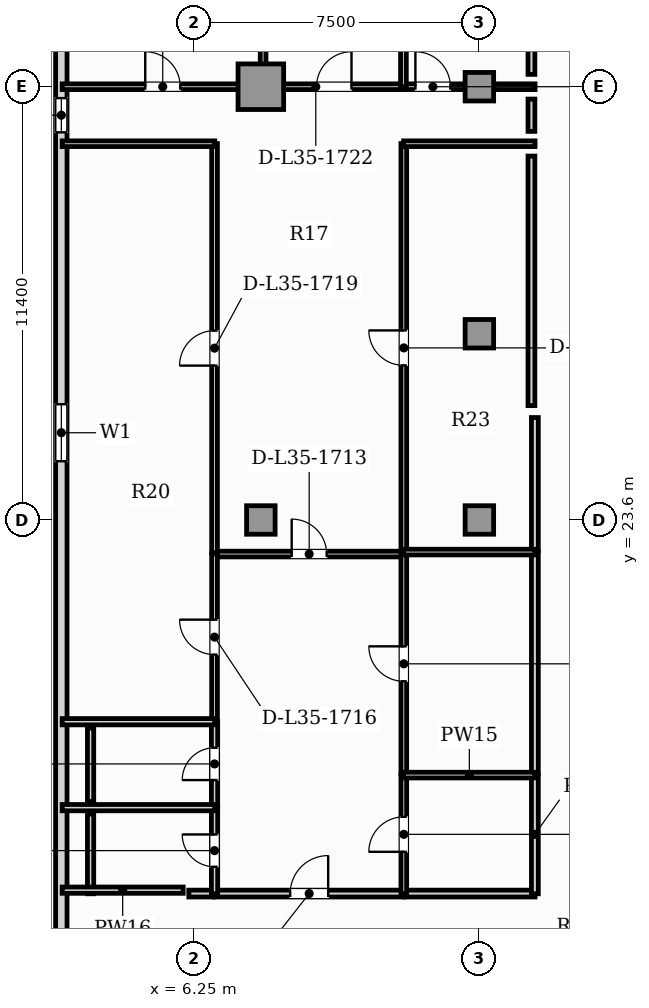
"""IFC4 building model, lengths in metres.
Left out: names, types, materials, properties, quantities, classifications, styles, units other than length and angle.
Written with IfcOpenShell. Run it as: python <this file> out.ifc"""

import sys

from ifc_helpers import new_model, si_unit, direction, frame, frame_2d, origin, origin_2d, place, context, subcontext, project, spatial, rectangle, hollow_rectangle, extrude, element, fill, save


model = new_model("IFC4")
c1 = context("Model", 3, precision=1e-05, world=origin(), true_north=direction((0.0, 1.0)))
c2 = subcontext(c1, "Body", "Model", "MODEL_VIEW")
j1 = project(units=[si_unit("LENGTHUNIT", "METRE"), si_unit("PLANEANGLEUNIT", "RADIAN")], contexts=[c1])
p1 = place(None, origin())
s1 = spatial("IfcSite", under=j1, at=p1, CompositionType="ELEMENT")
p2 = place(p1, origin())
s2 = spatial("IfcBuilding", under=s1, at=p2, CompositionType="ELEMENT")
p3 = place(p2, frame((0.0, 0.0, 145.2)))
s3 = spatial("IfcBuildingStorey", under=s2, at=p3, CompositionType="ELEMENT", Elevation=145.2)
p4 = place(p3, frame((8.0, 35.0, 0.0), z_axis=(0.0, 0.0, 1.0), x_axis=(1.0, 0.0, 0.0)))
e1 = element("IfcColumn", 1, at=p4, inside=s3, PredefinedType="USERDEFINED", context=c2, shape_type="SweptSolid", body=[
    extrude(hollow_rectangle(XDim=1.2, YDim=1.2, WallThickness=0.07, at=origin_2d()), origin(), (0.0, 0.0, 1.0), 3.85),
])
for number, where, z_axis, x_axis in (
    (2, (8.0, 23.6, 0.0), (0.0, 0.0, 1.0), (1.0, 0.0, 0.0)),
    (3, (13.75, 23.6, 0.0), (0.0, 0.0, 1.0), (1.0, 0.0, 0.0)),
    (4, (13.75, 28.5, 0.0), (0.0, 0.0, 1.0), (1.0, 0.0, 0.0)),
    (5, (13.75, 35.0, 0.0), (0.0, 0.0, 1.0), (1.0, 0.0, 0.0)),
):
    element("IfcColumn", number, at=place(p3, frame(where, z_axis=z_axis, x_axis=x_axis)), inside=s3, PredefinedType="COLUMN", context=c2, shape_type="SweptSolid", body=[
        extrude(rectangle(XDim=0.75, YDim=0.75, at=origin_2d()), origin(), (0.0, 0.0, 1.0), 3.85),
    ])
p5 = place(p3, frame((2.75, 39.96, 0.0), z_axis=(0.0, 0.0, 1.0), x_axis=(0.0, -1.0, 0.0)))
e6 = element("IfcWall", 6, at=p5, inside=s3, PredefinedType="SOLIDWALL", context=c2, shape_type="SweptSolid", body=[
    extrude(rectangle(XDim=36.72, YDim=0.3, at=frame_2d((18.36, 0.0))), origin(), (0.0, 0.0, 1.0), 3.63),
])
p6 = place(p5, frame((5.26, 0.0, 0.95)))
e7 = element("IfcOpeningElement", 7, at=p6, cuts=e6, PredefinedType="OPENING", context=c2, shape_type="SweptSolid", body=[
    extrude(rectangle(XDim=0.9, YDim=1.5, at=frame_2d((0.45, 0.75))), frame((0.0, 0.16, 0.0), z_axis=(0.0, -1.0, 0.0), x_axis=(1.0, 0.0, 0.0)), (0.0, 0.0, 1.0), 0.32),
])
p7 = place(p5, frame((13.314, 0.0, 0.9)))
e8 = element("IfcOpeningElement", 8, at=p7, cuts=e6, PredefinedType="OPENING", context=c2, shape_type="SweptSolid", body=[
    extrude(rectangle(XDim=1.5, YDim=1.95, at=frame_2d((0.75, 0.975))), frame((0.0, 0.16, 0.0), z_axis=(0.0, -1.0, 0.0), x_axis=(1.0, 0.0, 0.0)), (0.0, 0.0, 1.0), 0.32),
])
p8 = place(p3, frame((6.777, 13.77, 0.0), z_axis=(0.0, 0.0, 1.0), x_axis=(1.0, 0.0, 0.0)))
e9 = element("IfcWall", 9, at=p8, inside=s3, PredefinedType="PARTITIONING", context=c2, shape_type="SweptSolid", body=[
    extrude(rectangle(XDim=4.99, YDim=0.18, at=frame_2d((2.495, 0.0))), origin(), (0.0, 0.0, 1.0), 3.63),
])
p9 = place(p8, frame((1.995, 0.0, 0.0)))
e10 = element("IfcOpeningElement", 10, at=p9, cuts=e9, PredefinedType="OPENING", context=c2, shape_type="SweptSolid", body=[
    extrude(rectangle(XDim=1.0, YDim=2.15, at=frame_2d((0.5, 1.075))), frame((0.0, 0.1, 0.0), z_axis=(0.0, -1.0, 0.0), x_axis=(1.0, 0.0, 0.0)), (0.0, 0.0, 1.0), 0.2),
])
p10 = place(p3, frame((6.105, 13.77, 0.0), z_axis=(0.0, 0.0, 1.0), x_axis=(1.0, 0.0, 0.0)))
e11 = element("IfcWall", 11, at=p10, inside=s3, PredefinedType="PARTITIONING", context=c2, shape_type="SweptSolid", body=[
    extrude(rectangle(XDim=0.642, YDim=0.18, at=frame_2d((0.321, 0.0))), origin(), (0.0, 0.0, 1.0), 3.63),
])
p11 = place(p3, frame((11.797, 13.77, 0.0), z_axis=(0.0, 0.0, 1.0), x_axis=(1.0, 0.0, 0.0)))
e12 = element("IfcWall", 12, at=p11, inside=s3, PredefinedType="PARTITIONING", context=c2, shape_type="SweptSolid", body=[
    extrude(rectangle(XDim=3.418, YDim=0.18, at=frame_2d((1.709, 0.0))), origin(), (0.0, 0.0, 1.0), 3.63),
])
p12 = place(p3, frame((15.21, 13.765, 0.0), z_axis=(0.0, 0.0, 1.0), x_axis=(0.0, 1.0, 0.0)))
e13 = element("IfcWall", 13, at=p12, inside=s3, PredefinedType="PARTITIONING", context=c2, shape_type="SweptSolid", body=[
    extrude(rectangle(XDim=3.127, YDim=0.18, at=frame_2d((1.564, 0.0))), origin(), (0.0, 0.0, 1.0), 3.63),
])
p13 = place(p3, frame((15.21, 16.922, 0.0), z_axis=(0.0, 0.0, 1.0), x_axis=(0.0, 1.0, 0.0)))
e14 = element("IfcWall", 14, at=p13, inside=s3, PredefinedType="PARTITIONING", context=c2, shape_type="SweptSolid", body=[
    extrude(rectangle(XDim=5.838, YDim=0.18, at=frame_2d((2.919, 0.0))), origin(), (0.0, 0.0, 1.0), 3.63),
])
p14 = place(p3, frame((15.21, 22.791, 0.0), z_axis=(0.0, 0.0, 1.0), x_axis=(0.0, 1.0, 0.0)))
e15 = element("IfcWall", 15, at=p14, inside=s3, PredefinedType="PARTITIONING", context=c2, shape_type="SweptSolid", body=[
    extrude(rectangle(XDim=3.504, YDim=0.18, at=frame_2d((1.752, 0.0))), origin(), (0.0, 0.0, 1.0), 3.63),
])
p15 = place(p3, frame((6.777, 22.703, 0.0), z_axis=(0.0, 0.0, 1.0), x_axis=(1.0, 0.0, 0.0)))
e16 = element("IfcWall", 16, at=p15, inside=s3, PredefinedType="PARTITIONING", context=c2, shape_type="SweptSolid", body=[
    extrude(rectangle(XDim=4.99, YDim=0.15, at=frame_2d((2.495, 0.0))), origin(), (0.0, 0.0, 1.0), 3.63),
])
p16 = place(p15, frame((2.035, 0.0, 0.0)))
e17 = element("IfcOpeningElement", 17, at=p16, cuts=e16, PredefinedType="OPENING", context=c2, shape_type="SweptSolid", body=[
    extrude(rectangle(XDim=0.92, YDim=2.1, at=frame_2d((0.46, 1.05))), frame((0.0, 0.085, 0.0), z_axis=(0.0, -1.0, 0.0), x_axis=(1.0, 0.0, 0.0)), (0.0, 0.0, 1.0), 0.17),
])
p17 = place(p3, frame((6.782, 13.765, 0.0), z_axis=(0.0, 0.0, 1.0), x_axis=(0.0, 1.0, 0.0)))
e18 = element("IfcWall", 18, at=p17, inside=s3, PredefinedType="PLUMBINGWALL", context=c2, shape_type="SweptSolid", body=[
    extrude(rectangle(XDim=2.271, YDim=0.165, at=frame_2d((1.135, 0.0))), origin(), (0.0, 0.0, 1.0), 3.63),
])
p18 = place(p17, frame((0.71, 0.0, 0.0)))
e19 = element("IfcOpeningElement", 19, at=p18, cuts=e18, PredefinedType="OPENING", context=c2, shape_type="SweptSolid", body=[
    extrude(rectangle(XDim=0.85, YDim=2.1, at=frame_2d((0.425, 1.05))), frame((0.0, 0.093, 0.0), z_axis=(0.0, -1.0, 0.0), x_axis=(1.0, 0.0, 0.0)), (0.0, 0.0, 1.0), 0.185),
])
p19 = place(p3, frame((6.782, 16.066, 0.0), z_axis=(0.0, 0.0, 1.0), x_axis=(0.0, 1.0, 0.0)))
e20 = element("IfcWall", 20, at=p19, inside=s3, PredefinedType="PLUMBINGWALL", context=c2, shape_type="SweptSolid", body=[
    extrude(rectangle(XDim=2.231, YDim=0.165, at=frame_2d((1.115, 0.0))), origin(), (0.0, 0.0, 1.0), 3.63),
])
p20 = place(p19, frame((0.69, 0.0, 0.0)))
e21 = element("IfcOpeningElement", 21, at=p20, cuts=e20, PredefinedType="OPENING", context=c2, shape_type="SweptSolid", body=[
    extrude(rectangle(XDim=0.85, YDim=2.1, at=frame_2d((0.425, 1.05))), frame((0.0, 0.093, 0.0), z_axis=(0.0, -1.0, 0.0), x_axis=(1.0, 0.0, 0.0)), (0.0, 0.0, 1.0), 0.185),
])
p21 = place(p3, frame((6.782, 18.327, 0.0), z_axis=(0.0, 0.0, 1.0), x_axis=(0.0, 1.0, 0.0)))
e22 = element("IfcWall", 22, at=p21, inside=s3, PredefinedType="PARTITIONING", context=c2, shape_type="SweptSolid", body=[
    extrude(rectangle(XDim=4.381, YDim=0.15, at=frame_2d((2.191, 0.0))), origin(), (0.0, 0.0, 1.0), 3.63),
])
p22 = place(p21, frame((1.731, 0.0, 0.0)))
e23 = element("IfcOpeningElement", 23, at=p22, cuts=e22, PredefinedType="OPENING", context=c2, shape_type="SweptSolid", body=[
    extrude(rectangle(XDim=0.92, YDim=2.1, at=frame_2d((0.46, 1.05))), frame((0.0, 0.085, 0.0), z_axis=(0.0, -1.0, 0.0), x_axis=(1.0, 0.0, 0.0)), (0.0, 0.0, 1.0), 0.17),
])
p23 = place(p3, frame((11.762, 13.765, 0.0), z_axis=(0.0, 0.0, 1.0), x_axis=(0.0, 1.0, 0.0)))
e24 = element("IfcWall", 24, at=p23, inside=s3, PredefinedType="PARTITIONING", context=c2, shape_type="SweptSolid", body=[
    extrude(rectangle(XDim=3.127, YDim=0.15, at=frame_2d((1.564, 0.0))), origin(), (0.0, 0.0, 1.0), 3.63),
])
p24 = place(p23, frame((1.104, 0.0, 0.0)))
e25 = element("IfcOpeningElement", 25, at=p24, cuts=e24, PredefinedType="OPENING", context=c2, shape_type="SweptSolid", body=[
    extrude(rectangle(XDim=0.92, YDim=2.1, at=frame_2d((0.46, 1.05))), frame((0.0, 0.085, 0.0), z_axis=(0.0, -1.0, 0.0), x_axis=(1.0, 0.0, 0.0)), (0.0, 0.0, 1.0), 0.17),
])
p25 = place(p3, frame((11.762, 16.922, 0.0), z_axis=(0.0, 0.0, 1.0), x_axis=(0.0, 1.0, 0.0)))
e26 = element("IfcWall", 26, at=p25, inside=s3, PredefinedType="PARTITIONING", context=c2, shape_type="SweptSolid", body=[
    extrude(rectangle(XDim=5.786, YDim=0.15, at=frame_2d((2.893, 0.0))), origin(), (0.0, 0.0, 1.0), 3.63),
])
p26 = place(p25, frame((2.433, 0.0, 0.0)))
e27 = element("IfcOpeningElement", 27, at=p26, cuts=e26, PredefinedType="OPENING", context=c2, shape_type="SweptSolid", body=[
    extrude(rectangle(XDim=0.92, YDim=2.1, at=frame_2d((0.46, 1.05))), frame((0.0, 0.085, 0.0), z_axis=(0.0, -1.0, 0.0), x_axis=(1.0, 0.0, 0.0)), (0.0, 0.0, 1.0), 0.17),
])
p27 = place(p3, frame((6.782, 22.738, 0.0), z_axis=(0.0, 0.0, 1.0), x_axis=(0.0, 1.0, 0.0)))
e28 = element("IfcWall", 28, at=p27, inside=s3, PredefinedType="PARTITIONING", context=c2, shape_type="SweptSolid", body=[
    extrude(rectangle(XDim=10.767, YDim=0.15, at=frame_2d((5.383, 0.0))), origin(), (0.0, 0.0, 1.0), 3.63),
])
p28 = place(p27, frame((4.923, 0.0, 0.0)))
e29 = element("IfcOpeningElement", 29, at=p28, cuts=e28, PredefinedType="OPENING", context=c2, shape_type="SweptSolid", body=[
    extrude(rectangle(XDim=0.92, YDim=2.1, at=frame_2d((0.46, 1.05))), frame((0.0, 0.085, 0.0), z_axis=(0.0, -1.0, 0.0), x_axis=(1.0, 0.0, 0.0)), (0.0, 0.0, 1.0), 0.17),
])
p29 = place(p3, frame((2.772, 33.5, 0.0), z_axis=(0.0, 0.0, 1.0), x_axis=(1.0, 0.0, 0.0)))
e30 = element("IfcWall", 30, at=p29, inside=s3, PredefinedType="PARTITIONING", context=c2, shape_type="SweptSolid", body=[
    extrude(rectangle(XDim=4.014, YDim=0.15, at=frame_2d((2.007, 0.0))), origin(), (0.0, 0.0, 1.0), 3.63),
])
p30 = place(p3, frame((11.762, 22.75, 0.0), z_axis=(0.0, 0.0, 1.0), x_axis=(0.0, 1.0, 0.0)))
e31 = element("IfcWall", 31, at=p30, inside=s3, PredefinedType="PARTITIONING", context=c2, shape_type="SweptSolid", body=[
    extrude(rectangle(XDim=10.754, YDim=0.15, at=frame_2d((5.377, 0.0))), origin(), (0.0, 0.0, 1.0), 3.63),
])
p31 = place(p30, frame((4.917, 0.0, 0.0)))
e32 = element("IfcOpeningElement", 32, at=p31, cuts=e31, PredefinedType="OPENING", context=c2, shape_type="SweptSolid", body=[
    extrude(rectangle(XDim=0.92, YDim=2.1, at=frame_2d((0.46, 1.05))), frame((0.0, 0.085, 0.0), z_axis=(0.0, -1.0, 0.0), x_axis=(1.0, 0.0, 0.0)), (0.0, 0.0, 1.0), 0.17),
])
p32 = place(p3, frame((11.757, 33.5, 0.0), z_axis=(0.0, 0.0, 1.0), x_axis=(1.0, 0.0, 0.0)))
e33 = element("IfcWall", 33, at=p32, inside=s3, PredefinedType="PARTITIONING", context=c2, shape_type="SweptSolid", body=[
    extrude(rectangle(XDim=3.458, YDim=0.15, at=frame_2d((1.729, 0.0))), origin(), (0.0, 0.0, 1.0), 3.63),
])
p33 = place(p3, frame((2.772, 35.0, 0.0), z_axis=(0.0, 0.0, 1.0), x_axis=(1.0, 0.0, 0.0)))
e34 = element("IfcWall", 34, at=p33, inside=s3, PredefinedType="PARTITIONING", context=c2, shape_type="SweptSolid", body=[
    extrude(rectangle(XDim=5.292, YDim=0.15, at=frame_2d((2.646, 0.0))), origin(), (0.0, 0.0, 1.0), 3.63),
])
p34 = place(p33, frame((2.186, 0.0, 0.0)))
e35 = element("IfcOpeningElement", 35, at=p34, cuts=e34, PredefinedType="OPENING", context=c2, shape_type="SweptSolid", body=[
    extrude(rectangle(XDim=0.92, YDim=2.1, at=frame_2d((0.46, 1.05))), frame((0.0, 0.085, 0.0), z_axis=(0.0, -1.0, 0.0), x_axis=(1.0, 0.0, 0.0)), (0.0, 0.0, 1.0), 0.17),
])
p35 = place(p3, frame((8.094, 35.0, 0.0), z_axis=(0.0, 0.0, 1.0), x_axis=(1.0, 0.0, 0.0)))
e36 = element("IfcWall", 36, at=p35, inside=s3, PredefinedType="PARTITIONING", context=c2, shape_type="SweptSolid", body=[
    extrude(rectangle(XDim=3.662, YDim=0.15, at=frame_2d((1.831, 0.0))), origin(), (0.0, 0.0, 1.0), 3.013),
])
p36 = place(p35, frame((1.371, 0.0, 0.0)))
e37 = element("IfcOpeningElement", 37, at=p36, cuts=e36, PredefinedType="OPENING", context=c2, shape_type="SweptSolid", body=[
    extrude(rectangle(XDim=0.92, YDim=2.1, at=frame_2d((0.46, 1.05))), frame((0.0, 0.085, 0.0), z_axis=(0.0, -1.0, 0.0), x_axis=(1.0, 0.0, 0.0)), (0.0, 0.0, 1.0), 0.17),
])
p37 = place(p3, frame((11.787, 35.0, 0.0), z_axis=(0.0, 0.0, 1.0), x_axis=(1.0, 0.0, 0.0)))
e38 = element("IfcWall", 38, at=p37, inside=s3, PredefinedType="PARTITIONING", context=c2, shape_type="SweptSolid", body=[
    extrude(rectangle(XDim=3.428, YDim=0.15, at=frame_2d((1.714, 0.0))), origin(), (0.0, 0.0, 1.0), 3.013),
])
p38 = place(p37, frame((0.28, 0.0, 0.0)))
e39 = element("IfcOpeningElement", 39, at=p38, cuts=e38, PredefinedType="OPENING", context=c2, shape_type="SweptSolid", body=[
    extrude(rectangle(XDim=0.92, YDim=2.1, at=frame_2d((0.46, 1.05))), frame((0.0, 0.085, 0.0), z_axis=(0.0, -1.0, 0.0), x_axis=(1.0, 0.0, 0.0)), (0.0, 0.0, 1.0), 0.17),
])
for number, where, z_axis, x_axis in (
    (40, (2.772, 16.031, 0.0), (0.0, 0.0, 1.0), (1.0, 0.0, 0.0)),
    (41, (2.772, 18.292, 0.0), (0.0, 0.0, 1.0), (1.0, 0.0, 0.0)),
):
    element("IfcWall", number, at=place(p3, frame(where, z_axis=z_axis, x_axis=x_axis)), inside=s3, PredefinedType="PLUMBINGWALL", context=c2, shape_type="SweptSolid", body=[
        extrude(rectangle(XDim=4.014, YDim=0.165, at=frame_2d((2.007, 0.0))), origin(), (0.0, 0.0, 1.0), 3.63),
    ])
for number, where, z_axis, x_axis in (
    (42, (11.757, 16.887, 0.0), (0.0, 0.0, 1.0), (1.0, 0.0, 0.0)),
    (43, (11.757, 22.756, 0.0), (0.0, 0.0, 1.0), (1.0, 0.0, 0.0)),
):
    element("IfcWall", number, at=place(p3, frame(where, z_axis=z_axis, x_axis=x_axis)), inside=s3, PredefinedType="PARTITIONING", context=c2, shape_type="SweptSolid", body=[
        extrude(rectangle(XDim=3.458, YDim=0.15, at=frame_2d((1.729, 0.0))), origin(), (0.0, 0.0, 1.0), 3.63),
    ])
for number, where, z_axis, x_axis in (
    (44, (8.059, 34.995, 0.0), (0.0, 0.0, 1.0), (0.0, 1.0, 0.0)),
    (45, (11.752, 34.995, 0.0), (0.0, 0.0, 1.0), (0.0, 1.0, 0.0)),
):
    element("IfcWall", number, at=place(p3, frame(where, z_axis=z_axis, x_axis=x_axis)), inside=s3, PredefinedType="PARTITIONING", context=c2, shape_type="SweptSolid", body=[
        extrude(rectangle(XDim=8.032, YDim=0.15, at=frame_2d((4.016, 0.0))), origin(), (0.0, 0.0, 1.0), 3.63),
    ])
p39 = place(p3, frame((15.12, 34.675, 0.0), z_axis=(0.0, 0.0, 1.0), x_axis=(0.0, -1.0, 0.0)))
e46 = element("IfcWall", 46, at=p39, inside=s3, PredefinedType="PARTITIONING", context=c2, shape_type="SweptSolid", body=[
    extrude(rectangle(XDim=0.85, YDim=0.18, at=frame_2d((0.425, 0.0))), origin(), (0.0, 0.0, 1.0), 3.63),
])
p40 = place(p3, frame((3.52, 13.765, 0.0), z_axis=(0.0, 0.0, 1.0), x_axis=(0.0, 1.0, 0.0)))
e47 = element("IfcWall", 47, at=p40, inside=s3, PredefinedType="PLUMBINGWALL", context=c2, shape_type="SweptSolid", body=[
    extrude(rectangle(XDim=2.101, YDim=0.165, at=frame_2d((1.051, 0.0))), origin(), (0.0, 0.0, 1.0), 3.63),
])
p41 = place(p3, frame((5.956, 13.86, 0.0), z_axis=(0.0, 0.0, 1.0), x_axis=(-1.0, 0.0, 0.0)))
e48 = element("IfcWall", 48, at=p41, inside=s3, PredefinedType="PLUMBINGWALL", context=c2, shape_type="SweptSolid", body=[
    extrude(rectangle(XDim=3.184, YDim=0.165, at=frame_2d((1.592, 0.0))), origin(), (0.0, 0.0, 1.0), 3.63),
])
p42 = place(p3, frame((3.52, 16.196, 0.0), z_axis=(0.0, 0.0, 1.0), x_axis=(0.0, 1.0, 0.0)))
e49 = element("IfcWall", 49, at=p42, inside=s3, PredefinedType="PLUMBINGWALL", context=c2, shape_type="SweptSolid", body=[
    extrude(rectangle(XDim=1.931, YDim=0.165, at=frame_2d((0.965, 0.0))), origin(), (0.0, 0.0, 1.0), 3.63),
])
p43 = place(p3, frame((15.12, 33.175, 0.0), z_axis=(0.0, 0.0, 1.0), x_axis=(0.0, -1.0, 0.0)))
e50 = element("IfcWall", 50, at=p43, inside=s3, PredefinedType="PARTITIONING", context=c2, shape_type="SweptSolid", body=[
    extrude(rectangle(XDim=6.565, YDim=0.18, at=frame_2d((3.283, 0.0))), origin(), (0.0, 0.0, 1.0), 3.63),
])
p44 = place(p3, frame((15.12, 43.028, 0.0), z_axis=(0.0, 0.0, 1.0), x_axis=(0.0, -1.0, 0.0)))
e51 = element("IfcWall", 51, at=p44, inside=s3, PredefinedType="PARTITIONING", context=c2, shape_type="SweptSolid", body=[
    extrude(rectangle(XDim=7.703, YDim=0.18, at=frame_2d((3.851, 0.0))), origin(), (0.0, 0.0, 1.0), 3.63),
])
p45 = place(p6, origin())
e52 = element("IfcWindow", 52, at=p45, inside=s3, PartitioningType="SINGLE_PANEL", PredefinedType="WINDOW", context=c2, shape_type="SweptSolid", body=[
    extrude(rectangle(XDim=0.9, YDim=1.5, at=frame_2d((0.45, 0.75))), frame((0.0, 0.03, 0.0), z_axis=(0.0, -1.0, 0.0), x_axis=(1.0, 0.0, 0.0)), (0.0, 0.0, 1.0), 0.06),
])
fill(e7, e52)
p46 = place(p7, origin())
e53 = element("IfcWindow", 53, at=p46, inside=s3, PartitioningType="SINGLE_PANEL", PredefinedType="WINDOW", context=c2, shape_type="SweptSolid", body=[
    extrude(rectangle(XDim=1.5, YDim=1.95, at=frame_2d((0.75, 0.975))), frame((0.0, 0.03, 0.0), z_axis=(0.0, -1.0, 0.0), x_axis=(1.0, 0.0, 0.0)), (0.0, 0.0, 1.0), 0.06),
])
fill(e8, e53)
p47 = place(p9, origin())
e54 = element("IfcDoor", 54, at=p47, inside=s3, OperationType="SINGLE_SWING_RIGHT", PredefinedType="DOOR", context=c2, shape_type="SweptSolid", body=[
    extrude(rectangle(XDim=1.0, YDim=2.15, at=frame_2d((0.5, 1.075))), frame((0.0, 0.025, 0.0), z_axis=(0.0, -1.0, 0.0), x_axis=(1.0, 0.0, 0.0)), (0.0, 0.0, 1.0), 0.05),
])
fill(e10, e54)
p48 = place(p16, origin())
e55 = element("IfcDoor", 55, at=p48, inside=s3, OperationType="SINGLE_SWING_LEFT", PredefinedType="DOOR", context=c2, shape_type="SweptSolid", body=[
    extrude(rectangle(XDim=0.92, YDim=2.1, at=frame_2d((0.46, 1.05))), frame((0.0, 0.025, 0.0), z_axis=(0.0, -1.0, 0.0), x_axis=(1.0, 0.0, 0.0)), (0.0, 0.0, 1.0), 0.05),
])
fill(e17, e55)
p49 = place(p18, origin())
e56 = element("IfcDoor", 56, at=p49, inside=s3, OperationType="SINGLE_SWING_RIGHT", PredefinedType="DOOR", context=c2, shape_type="SweptSolid", body=[
    extrude(rectangle(XDim=0.85, YDim=2.1, at=frame_2d((0.425, 1.05))), frame((0.0, 0.025, 0.0), z_axis=(0.0, -1.0, 0.0), x_axis=(1.0, 0.0, 0.0)), (0.0, 0.0, 1.0), 0.05),
])
fill(e19, e56)
p50 = place(p20, origin())
e57 = element("IfcDoor", 57, at=p50, inside=s3, OperationType="SINGLE_SWING_LEFT", PredefinedType="DOOR", context=c2, shape_type="SweptSolid", body=[
    extrude(rectangle(XDim=0.85, YDim=2.1, at=frame_2d((0.425, 1.05))), frame((0.0, 0.025, 0.0), z_axis=(0.0, -1.0, 0.0), x_axis=(1.0, 0.0, 0.0)), (0.0, 0.0, 1.0), 0.05),
])
fill(e21, e57)
p51 = place(p22, origin())
e58 = element("IfcDoor", 58, at=p51, inside=s3, OperationType="SINGLE_SWING_RIGHT", PredefinedType="DOOR", context=c2, shape_type="SweptSolid", body=[
    extrude(rectangle(XDim=0.92, YDim=2.1, at=frame_2d((0.46, 1.05))), frame((0.0, 0.025, 0.0), z_axis=(0.0, -1.0, 0.0), x_axis=(1.0, 0.0, 0.0)), (0.0, 0.0, 1.0), 0.05),
])
fill(e23, e58)
p52 = place(p24, origin())
e59 = element("IfcDoor", 59, at=p52, inside=s3, OperationType="SINGLE_SWING_LEFT", PredefinedType="DOOR", context=c2, shape_type="SweptSolid", body=[
    extrude(rectangle(XDim=0.92, YDim=2.1, at=frame_2d((0.46, 1.05))), frame((0.0, 0.025, 0.0), z_axis=(0.0, -1.0, 0.0), x_axis=(1.0, 0.0, 0.0)), (0.0, 0.0, 1.0), 0.05),
])
fill(e25, e59)
p53 = place(p26, origin())
e60 = element("IfcDoor", 60, at=p53, inside=s3, OperationType="SINGLE_SWING_RIGHT", PredefinedType="DOOR", context=c2, shape_type="SweptSolid", body=[
    extrude(rectangle(XDim=0.92, YDim=2.1, at=frame_2d((0.46, 1.05))), frame((0.0, 0.025, 0.0), z_axis=(0.0, -1.0, 0.0), x_axis=(1.0, 0.0, 0.0)), (0.0, 0.0, 1.0), 0.05),
])
fill(e27, e60)
p54 = place(p28, origin())
e61 = element("IfcDoor", 61, at=p54, inside=s3, OperationType="SINGLE_SWING_LEFT", PredefinedType="DOOR", context=c2, shape_type="SweptSolid", body=[
    extrude(rectangle(XDim=0.92, YDim=2.1, at=frame_2d((0.46, 1.05))), frame((0.0, 0.025, 0.0), z_axis=(0.0, -1.0, 0.0), x_axis=(1.0, 0.0, 0.0)), (0.0, 0.0, 1.0), 0.05),
])
fill(e29, e61)
p55 = place(p31, origin())
e62 = element("IfcDoor", 62, at=p55, inside=s3, OperationType="SINGLE_SWING_RIGHT", PredefinedType="DOOR", context=c2, shape_type="SweptSolid", body=[
    extrude(rectangle(XDim=0.92, YDim=2.1, at=frame_2d((0.46, 1.05))), frame((0.0, 0.025, 0.0), z_axis=(0.0, -1.0, 0.0), x_axis=(1.0, 0.0, 0.0)), (0.0, 0.0, 1.0), 0.05),
])
fill(e32, e62)
p56 = place(p34, origin())
e63 = element("IfcDoor", 63, at=p56, inside=s3, OperationType="SINGLE_SWING_LEFT", PredefinedType="DOOR", context=c2, shape_type="SweptSolid", body=[
    extrude(rectangle(XDim=0.92, YDim=2.1, at=frame_2d((0.46, 1.05))), frame((0.0, 0.025, 0.0), z_axis=(0.0, -1.0, 0.0), x_axis=(1.0, 0.0, 0.0)), (0.0, 0.0, 1.0), 0.05),
])
fill(e35, e63)
p57 = place(p36, origin())
e64 = element("IfcDoor", 64, at=p57, inside=s3, OperationType="SINGLE_SWING_RIGHT", PredefinedType="DOOR", context=c2, shape_type="SweptSolid", body=[
    extrude(rectangle(XDim=0.92, YDim=2.1, at=frame_2d((0.46, 1.05))), frame((0.0, 0.025, 0.0), z_axis=(0.0, -1.0, 0.0), x_axis=(1.0, 0.0, 0.0)), (0.0, 0.0, 1.0), 0.05),
])
fill(e37, e64)
p58 = place(p38, origin())
e65 = element("IfcDoor", 65, at=p58, inside=s3, OperationType="SINGLE_SWING_LEFT", PredefinedType="DOOR", context=c2, shape_type="SweptSolid", body=[
    extrude(rectangle(XDim=0.92, YDim=2.1, at=frame_2d((0.46, 1.05))), frame((0.0, 0.025, 0.0), z_axis=(0.0, -1.0, 0.0), x_axis=(1.0, 0.0, 0.0)), (0.0, 0.0, 1.0), 0.05),
])
fill(e39, e65)
save(model, sys.argv[1])
